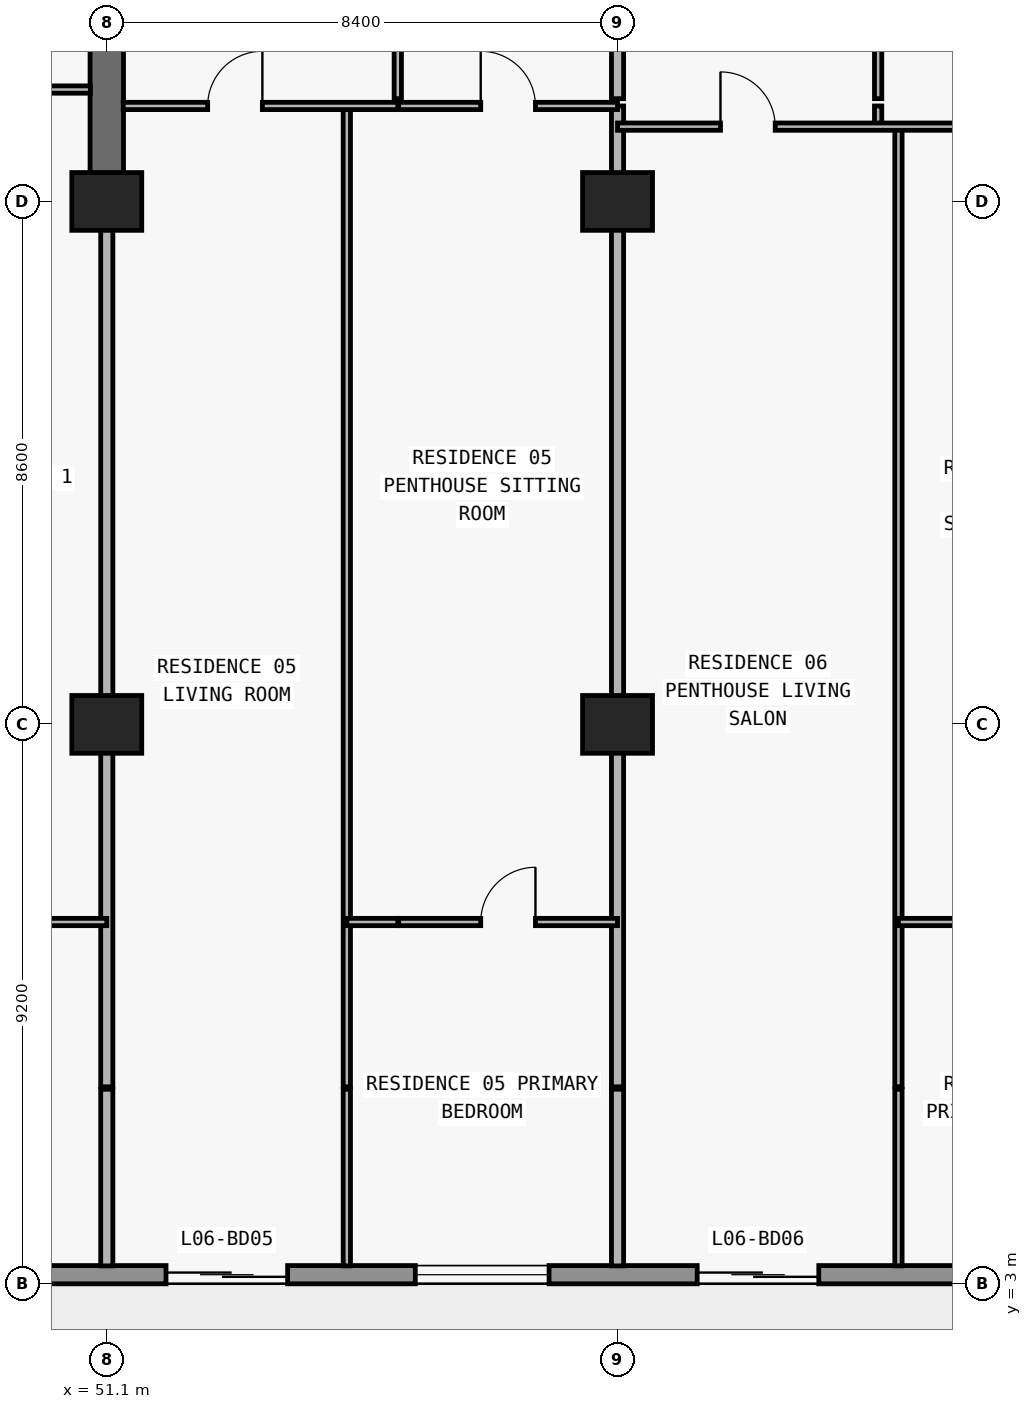
"""IFC4 building model, lengths in metres.
Left out: names, types, materials, properties, quantities, classifications, styles, units other than length and angle.
Written with IfcOpenShell. Run it as: python <this file> out.ifc"""

import sys

from ifc_helpers import new_model, si_unit, direction, frame, frame_2d, origin, origin_2d, place, context, subcontext, project, spatial, rectangle, extrude, element, fill, save


model = new_model("IFC4")
c1 = context("Model", 3, precision=1e-05, world=origin(), true_north=direction((0.0, 1.0)))
c2 = subcontext(c1, "Body", "Model", "MODEL_VIEW")
j1 = project(units=[si_unit("LENGTHUNIT", "METRE"), si_unit("PLANEANGLEUNIT", "RADIAN")], contexts=[c1])
p1 = place(None, origin())
s1 = spatial("IfcSite", under=j1, at=p1, CompositionType="ELEMENT")
p2 = place(p1, origin())
s2 = spatial("IfcBuilding", under=s1, at=p2, CompositionType="ELEMENT")
p3 = place(p2, frame((0.0, 0.0, 30.0)))
s3 = spatial("IfcBuildingStorey", under=s2, at=p3, CompositionType="ELEMENT", Elevation=30.0)
for number, where, z_axis, x_axis in (
    (1, (51.1, 12.2, 0.0), (0.0, 0.0, 1.0), (1.0, 0.0, 0.0)),
    (2, (59.5, 12.2, 0.0), (0.0, 0.0, 1.0), (1.0, 0.0, 0.0)),
    (3, (51.1, 20.8, 0.0), (0.0, 0.0, 1.0), (1.0, 0.0, 0.0)),
    (4, (59.5, 20.8, 0.0), (0.0, 0.0, 1.0), (1.0, 0.0, 0.0)),
):
    element("IfcColumn", number, at=place(p3, frame(where, z_axis=z_axis, x_axis=x_axis)), inside=s3, PredefinedType="COLUMN", context=c2, shape_type="SweptSolid", body=[
        extrude(rectangle(XDim=1.15, YDim=0.95, at=origin_2d()), origin(), (0.0, 0.0, 1.0), 3.05),
    ])
p4 = place(p3, frame((51.1, 20.8, 0.0), z_axis=(0.0, 0.0, 1.0), x_axis=(0.0, 1.0, 0.0)))
e5 = element("IfcWall", 5, at=p4, inside=s3, PredefinedType="SHEAR", context=c2, shape_type="SweptSolid", body=[
    extrude(rectangle(XDim=8.6, YDim=0.55, at=frame_2d((4.3, 0.0))), origin(), (0.0, 0.0, 1.0), 3.05),
])
p5 = place(p3, frame((72.7, 3.15, 0.0), z_axis=(0.0, 0.0, 1.0), x_axis=(-1.0, 0.0, 0.0)))
e6 = element("IfcWall", 6, at=p5, inside=s3, PredefinedType="STANDARD", context=c2, shape_type="SweptSolid", body=[
    extrude(rectangle(XDim=67.6, YDim=0.3, at=frame_2d((33.8, 0.0))), origin(), (0.0, 0.0, 1.0), 3.05),
])
p6 = place(p5, frame((59.826, 0.0, 0.0)))
e7 = element("IfcOpeningElement", 7, at=p6, cuts=e6, PredefinedType="OPENING", context=c2, shape_type="SweptSolid", body=[
    extrude(rectangle(XDim=2.0, YDim=2.3, at=frame_2d((1.0, 1.15))), frame((0.0, 0.16, 0.0), z_axis=(0.0, -1.0, 0.0), x_axis=(1.0, 0.0, 0.0)), (0.0, 0.0, 1.0), 0.32),
])
p7 = place(p5, frame((55.526, 0.0, 0.85)))
e8 = element("IfcOpeningElement", 8, at=p7, cuts=e6, PredefinedType="OPENING", context=c2, shape_type="SweptSolid", body=[
    extrude(rectangle(XDim=2.2, YDim=1.55, at=frame_2d((1.1, 0.775))), frame((0.0, 0.16, 0.0), z_axis=(0.0, -1.0, 0.0), x_axis=(1.0, 0.0, 0.0)), (0.0, 0.0, 1.0), 0.32),
])
p8 = place(p5, frame((51.09, 0.0, 0.0)))
e9 = element("IfcOpeningElement", 9, at=p8, cuts=e6, PredefinedType="OPENING", context=c2, shape_type="SweptSolid", body=[
    extrude(rectangle(XDim=2.0, YDim=2.3, at=frame_2d((1.0, 1.15))), frame((0.0, 0.16, 0.0), z_axis=(0.0, -1.0, 0.0), x_axis=(1.0, 0.0, 0.0)), (0.0, 0.0, 1.0), 0.32),
])
p9 = place(p5, frame((46.99, 0.0, 0.85)))
e10 = element("IfcOpeningElement", 10, at=p9, cuts=e6, PredefinedType="OPENING", context=c2, shape_type="SweptSolid", body=[
    extrude(rectangle(XDim=1.8, YDim=1.55, at=frame_2d((0.9, 0.775))), frame((0.0, 0.16, 0.0), z_axis=(0.0, -1.0, 0.0), x_axis=(1.0, 0.0, 0.0)), (0.0, 0.0, 1.0), 0.32),
])
p10 = place(p5, frame((43.026, 0.0, 0.0)))
e11 = element("IfcOpeningElement", 11, at=p10, cuts=e6, PredefinedType="OPENING", context=c2, shape_type="SweptSolid", body=[
    extrude(rectangle(XDim=2.0, YDim=2.3, at=frame_2d((1.0, 1.15))), frame((0.0, 0.16, 0.0), z_axis=(0.0, -1.0, 0.0), x_axis=(1.0, 0.0, 0.0)), (0.0, 0.0, 1.0), 0.32),
])
p11 = place(p5, frame((38.726, 0.0, 0.85)))
e12 = element("IfcOpeningElement", 12, at=p11, cuts=e6, PredefinedType="OPENING", context=c2, shape_type="SweptSolid", body=[
    extrude(rectangle(XDim=2.2, YDim=1.55, at=frame_2d((1.1, 0.775))), frame((0.0, 0.16, 0.0), z_axis=(0.0, -1.0, 0.0), x_axis=(1.0, 0.0, 0.0)), (0.0, 0.0, 1.0), 0.32),
])
p12 = place(p5, frame((34.69, 0.0, 0.0)))
e13 = element("IfcOpeningElement", 13, at=p12, cuts=e6, PredefinedType="OPENING", context=c2, shape_type="SweptSolid", body=[
    extrude(rectangle(XDim=2.0, YDim=2.3, at=frame_2d((1.0, 1.15))), frame((0.0, 0.16, 0.0), z_axis=(0.0, -1.0, 0.0), x_axis=(1.0, 0.0, 0.0)), (0.0, 0.0, 1.0), 0.32),
])
p13 = place(p5, frame((30.81, 0.0, 0.65)))
e14 = element("IfcOpeningElement", 14, at=p13, cuts=e6, PredefinedType="OPENING", context=c2, shape_type="SweptSolid", body=[
    extrude(rectangle(XDim=2.6, YDim=1.85, at=frame_2d((1.3, 0.925))), frame((0.0, 0.16, 0.0), z_axis=(0.0, -1.0, 0.0), x_axis=(1.0, 0.0, 0.0)), (0.0, 0.0, 1.0), 0.32),
])
p14 = place(p5, frame((24.7, 0.0, 0.85)))
e15 = element("IfcOpeningElement", 15, at=p14, cuts=e6, PredefinedType="OPENING", context=c2, shape_type="SweptSolid", body=[
    extrude(rectangle(XDim=2.2, YDim=1.55, at=frame_2d((1.1, 0.775))), frame((0.0, 0.16, 0.0), z_axis=(0.0, -1.0, 0.0), x_axis=(1.0, 0.0, 0.0)), (0.0, 0.0, 1.0), 0.32),
])
p15 = place(p5, frame((18.626, 0.0, 0.0)))
e16 = element("IfcOpeningElement", 16, at=p15, cuts=e6, PredefinedType="OPENING", context=c2, shape_type="SweptSolid", body=[
    extrude(rectangle(XDim=2.0, YDim=2.3, at=frame_2d((1.0, 1.15))), frame((0.0, 0.16, 0.0), z_axis=(0.0, -1.0, 0.0), x_axis=(1.0, 0.0, 0.0)), (0.0, 0.0, 1.0), 0.32),
])
p16 = place(p5, frame((14.326, 0.0, 0.85)))
e17 = element("IfcOpeningElement", 17, at=p16, cuts=e6, PredefinedType="OPENING", context=c2, shape_type="SweptSolid", body=[
    extrude(rectangle(XDim=2.2, YDim=1.55, at=frame_2d((1.1, 0.775))), frame((0.0, 0.16, 0.0), z_axis=(0.0, -1.0, 0.0), x_axis=(1.0, 0.0, 0.0)), (0.0, 0.0, 1.0), 0.32),
])
p17 = place(p5, frame((9.89, 0.0, 0.0)))
e18 = element("IfcOpeningElement", 18, at=p17, cuts=e6, PredefinedType="OPENING", context=c2, shape_type="SweptSolid", body=[
    extrude(rectangle(XDim=2.0, YDim=2.3, at=frame_2d((1.0, 1.15))), frame((0.0, 0.16, 0.0), z_axis=(0.0, -1.0, 0.0), x_axis=(1.0, 0.0, 0.0)), (0.0, 0.0, 1.0), 0.32),
])
p18 = place(p5, frame((5.79, 0.0, 0.85)))
e19 = element("IfcOpeningElement", 19, at=p18, cuts=e6, PredefinedType="OPENING", context=c2, shape_type="SweptSolid", body=[
    extrude(rectangle(XDim=1.8, YDim=1.55, at=frame_2d((0.9, 0.775))), frame((0.0, 0.16, 0.0), z_axis=(0.0, -1.0, 0.0), x_axis=(1.0, 0.0, 0.0)), (0.0, 0.0, 1.0), 0.32),
])
p19 = place(p3, frame((51.1, 3.295, 0.0), z_axis=(0.0, 0.0, 1.0), x_axis=(0.0, 1.0, 0.0)))
e20 = element("IfcWall", 20, at=p19, inside=s3, PredefinedType="PARTITIONING", context=c2, shape_type="SweptSolid", body=[
    extrude(rectangle(XDim=2.905, YDim=0.2, at=frame_2d((1.453, 0.0))), origin(), (0.0, 0.0, 1.0), 3.05),
])
p20 = place(p3, frame((51.1, 6.24, 0.0), z_axis=(0.0, 0.0, 1.0), x_axis=(0.0, 1.0, 0.0)))
e21 = element("IfcWall", 21, at=p20, inside=s3, PredefinedType="PARTITIONING", context=c2, shape_type="SweptSolid", body=[
    extrude(rectangle(XDim=14.555, YDim=0.2, at=frame_2d((7.277, 0.0))), origin(), (0.0, 0.0, 1.0), 2.11),
])
p21 = place(p3, frame((55.048, 3.295, 0.0), z_axis=(0.0, 0.0, 1.0), x_axis=(0.0, 1.0, 0.0)))
e22 = element("IfcWall", 22, at=p21, inside=s3, PredefinedType="PARTITIONING", context=c2, shape_type="SweptSolid", body=[
    extrude(rectangle(XDim=2.905, YDim=0.12, at=frame_2d((1.453, 0.0))), origin(), (0.0, 0.0, 1.0), 3.05),
])
p22 = place(p3, frame((55.048, 6.24, 0.0), z_axis=(0.0, 0.0, 1.0), x_axis=(0.0, 1.0, 0.0)))
e23 = element("IfcWall", 23, at=p22, inside=s3, PredefinedType="PARTITIONING", context=c2, shape_type="SweptSolid", body=[
    extrude(rectangle(XDim=16.13, YDim=0.12, at=frame_2d((8.065, 0.0))), origin(), (0.0, 0.0, 1.0), 3.05),
])
p23 = place(p3, frame((55.886, 22.49, 0.0), z_axis=(0.0, 0.0, 1.0), x_axis=(0.0, 1.0, 0.0)))
e24 = element("IfcWall", 24, at=p23, inside=s3, PredefinedType="PARTITIONING", context=c2, shape_type="SweptSolid", body=[
    extrude(rectangle(XDim=4.69, YDim=0.12, at=frame_2d((2.345, 0.0))), origin(), (0.0, 0.0, 1.0), 3.05),
])
p24 = place(p23, frame((1.895, 0.0, 0.0)))
e25 = element("IfcOpeningElement", 25, at=p24, cuts=e24, PredefinedType="OPENING", context=c2, shape_type="SweptSolid", body=[
    extrude(rectangle(XDim=0.9, YDim=2.15, at=frame_2d((0.45, 1.075))), frame((0.0, 0.07, 0.0), z_axis=(0.0, -1.0, 0.0), x_axis=(1.0, 0.0, 0.0)), (0.0, 0.0, 1.0), 0.14),
])
p25 = place(p3, frame((59.5, 3.295, 0.0), z_axis=(0.0, 0.0, 1.0), x_axis=(0.0, 1.0, 0.0)))
e26 = element("IfcWall", 26, at=p25, inside=s3, PredefinedType="PARTITIONING", context=c2, shape_type="SweptSolid", body=[
    extrude(rectangle(XDim=2.905, YDim=0.2, at=frame_2d((1.453, 0.0))), origin(), (0.0, 0.0, 1.0), 3.05),
])
p26 = place(p3, frame((59.5, 6.24, 0.0), z_axis=(0.0, 0.0, 1.0), x_axis=(0.0, 1.0, 0.0)))
e27 = element("IfcWall", 27, at=p26, inside=s3, PredefinedType="PARTITIONING", context=c2, shape_type="SweptSolid", body=[
    extrude(rectangle(XDim=16.13, YDim=0.2, at=frame_2d((8.065, 0.0))), origin(), (0.0, 0.0, 1.0), 2.11),
])
p27 = place(p3, frame((59.5, 22.49, 0.0), z_axis=(0.0, 0.0, 1.0), x_axis=(0.0, 1.0, 0.0)))
e28 = element("IfcWall", 28, at=p27, inside=s3, PredefinedType="PARTITIONING", context=c2, shape_type="SweptSolid", body=[
    extrude(rectangle(XDim=4.69, YDim=0.2, at=frame_2d((2.345, 0.0))), origin(), (0.0, 0.0, 1.0), 2.11),
])
p28 = place(p3, frame((63.786, 22.03, 0.0), z_axis=(0.0, 0.0, 1.0), x_axis=(0.0, 1.0, 0.0)))
e29 = element("IfcWall", 29, at=p28, inside=s3, PredefinedType="PARTITIONING", context=c2, shape_type="SweptSolid", body=[
    extrude(rectangle(XDim=0.34, YDim=0.12, at=frame_2d((0.17, 0.0))), origin(), (0.0, 0.0, 1.0), 3.05),
])
p29 = place(p3, frame((63.786, 22.49, 0.0), z_axis=(0.0, 0.0, 1.0), x_axis=(0.0, 1.0, 0.0)))
e30 = element("IfcWall", 30, at=p29, inside=s3, PredefinedType="PARTITIONING", context=c2, shape_type="SweptSolid", body=[
    extrude(rectangle(XDim=4.69, YDim=0.12, at=frame_2d((2.345, 0.0))), origin(), (0.0, 0.0, 1.0), 3.05),
])
p30 = place(p29, frame((1.895, 0.0, 0.0)))
e31 = element("IfcOpeningElement", 31, at=p30, cuts=e30, PredefinedType="OPENING", context=c2, shape_type="SweptSolid", body=[
    extrude(rectangle(XDim=0.9, YDim=2.15, at=frame_2d((0.45, 1.075))), frame((0.0, 0.07, 0.0), z_axis=(0.0, -1.0, 0.0), x_axis=(1.0, 0.0, 0.0)), (0.0, 0.0, 1.0), 0.14),
])
p31 = place(p3, frame((64.12, 3.295, 0.0), z_axis=(0.0, 0.0, 1.0), x_axis=(0.0, 1.0, 0.0)))
e32 = element("IfcWall", 32, at=p31, inside=s3, PredefinedType="PARTITIONING", context=c2, shape_type="SweptSolid", body=[
    extrude(rectangle(XDim=2.905, YDim=0.12, at=frame_2d((1.453, 0.0))), origin(), (0.0, 0.0, 1.0), 3.05),
])
p32 = place(p3, frame((64.12, 6.24, 0.0), z_axis=(0.0, 0.0, 1.0), x_axis=(0.0, 1.0, 0.0)))
e33 = element("IfcWall", 33, at=p32, inside=s3, PredefinedType="PARTITIONING", context=c2, shape_type="SweptSolid", body=[
    extrude(rectangle(XDim=15.79, YDim=0.12, at=frame_2d((7.895, 0.0))), origin(), (0.0, 0.0, 1.0), 3.05),
])
p33 = place(p3, frame((42.7, 8.95, 0.0), z_axis=(0.0, 0.0, 1.0), x_axis=(1.0, 0.0, 0.0)))
e34 = element("IfcWall", 34, at=p33, inside=s3, PredefinedType="PARTITIONING", context=c2, shape_type="SweptSolid", body=[
    extrude(rectangle(XDim=8.4, YDim=0.12, at=frame_2d((4.2, 0.0))), origin(), (0.0, 0.0, 1.0), 3.05),
])
p34 = place(p33, frame((3.75, 0.0, 0.0)))
e35 = element("IfcOpeningElement", 35, at=p34, cuts=e34, PredefinedType="OPENING", context=c2, shape_type="SweptSolid", body=[
    extrude(rectangle(XDim=0.9, YDim=2.15, at=frame_2d((0.45, 1.075))), frame((0.0, 0.07, 0.0), z_axis=(0.0, -1.0, 0.0), x_axis=(1.0, 0.0, 0.0)), (0.0, 0.0, 1.0), 0.14),
])
p35 = place(p3, frame((55.048, 8.95, 0.0), z_axis=(0.0, 0.0, 1.0), x_axis=(1.0, 0.0, 0.0)))
e36 = element("IfcWall", 36, at=p35, inside=s3, PredefinedType="PARTITIONING", context=c2, shape_type="SweptSolid", body=[
    extrude(rectangle(XDim=0.838, YDim=0.12, at=frame_2d((0.419, 0.0))), origin(), (0.0, 0.0, 1.0), 3.05),
])
p36 = place(p3, frame((55.9, 8.95, 0.0), z_axis=(0.0, 0.0, 1.0), x_axis=(1.0, 0.0, 0.0)))
e37 = element("IfcWall", 37, at=p36, inside=s3, PredefinedType="PARTITIONING", context=c2, shape_type="SweptSolid", body=[
    extrude(rectangle(XDim=3.6, YDim=0.12, at=frame_2d((1.8, 0.0))), origin(), (0.0, 0.0, 1.0), 3.05),
])
p37 = place(p36, frame((1.35, 0.0, 0.0)))
e38 = element("IfcOpeningElement", 38, at=p37, cuts=e37, PredefinedType="OPENING", context=c2, shape_type="SweptSolid", body=[
    extrude(rectangle(XDim=0.9, YDim=2.15, at=frame_2d((0.45, 1.075))), frame((0.0, 0.07, 0.0), z_axis=(0.0, -1.0, 0.0), x_axis=(1.0, 0.0, 0.0)), (0.0, 0.0, 1.0), 0.14),
])
p38 = place(p3, frame((64.12, 8.95, 0.0), z_axis=(0.0, 0.0, 1.0), x_axis=(1.0, 0.0, 0.0)))
e39 = element("IfcWall", 39, at=p38, inside=s3, PredefinedType="PARTITIONING", context=c2, shape_type="SweptSolid", body=[
    extrude(rectangle(XDim=3.78, YDim=0.12, at=frame_2d((1.89, 0.0))), origin(), (0.0, 0.0, 1.0), 3.05),
])
p39 = place(p38, frame((1.44, 0.0, 0.0)))
e40 = element("IfcOpeningElement", 40, at=p39, cuts=e39, PredefinedType="OPENING", context=c2, shape_type="SweptSolid", body=[
    extrude(rectangle(XDim=0.9, YDim=2.15, at=frame_2d((0.45, 1.075))), frame((0.0, 0.07, 0.0), z_axis=(0.0, -1.0, 0.0), x_axis=(1.0, 0.0, 0.0)), (0.0, 0.0, 1.0), 0.14),
])
p40 = place(p3, frame((59.5, 22.03, 0.0), z_axis=(0.0, 0.0, 1.0), x_axis=(1.0, 0.0, 0.0)))
e41 = element("IfcWall", 41, at=p40, inside=s3, PredefinedType="PARTITIONING", context=c2, shape_type="SweptSolid", body=[
    extrude(rectangle(XDim=8.4, YDim=0.12, at=frame_2d((4.2, 0.0))), origin(), (0.0, 0.0, 1.0), 3.05),
])
p41 = place(p40, frame((1.693, 0.0, 0.0)))
e42 = element("IfcOpeningElement", 42, at=p41, cuts=e41, PredefinedType="OPENING", context=c2, shape_type="SweptSolid", body=[
    extrude(rectangle(XDim=0.9, YDim=2.15, at=frame_2d((0.45, 1.075))), frame((0.0, 0.07, 0.0), z_axis=(0.0, -1.0, 0.0), x_axis=(1.0, 0.0, 0.0)), (0.0, 0.0, 1.0), 0.14),
])
p42 = place(p40, frame((6.06, 0.0, 0.0)))
e43 = element("IfcOpeningElement", 43, at=p42, cuts=e41, PredefinedType="OPENING", context=c2, shape_type="SweptSolid", body=[
    extrude(rectangle(XDim=0.9, YDim=2.15, at=frame_2d((0.45, 1.075))), frame((0.0, 0.07, 0.0), z_axis=(0.0, -1.0, 0.0), x_axis=(1.0, 0.0, 0.0)), (0.0, 0.0, 1.0), 0.14),
])
p43 = place(p3, frame((51.37, 22.37, 0.0), z_axis=(0.0, 0.0, 1.0), x_axis=(1.0, 0.0, 0.0)))
e44 = element("IfcWall", 44, at=p43, inside=s3, PredefinedType="PARTITIONING", context=c2, shape_type="SweptSolid", body=[
    extrude(rectangle(XDim=4.516, YDim=0.12, at=frame_2d((2.258, 0.0))), origin(), (0.0, 0.0, 1.0), 3.05),
])
p44 = place(p43, frame((1.389, 0.0, 0.0)))
e45 = element("IfcOpeningElement", 45, at=p44, cuts=e44, PredefinedType="OPENING", context=c2, shape_type="SweptSolid", body=[
    extrude(rectangle(XDim=0.9, YDim=2.15, at=frame_2d((0.45, 1.075))), frame((0.0, 0.07, 0.0), z_axis=(0.0, -1.0, 0.0), x_axis=(1.0, 0.0, 0.0)), (0.0, 0.0, 1.0), 0.14),
])
p45 = place(p3, frame((55.9, 22.37, 0.0), z_axis=(0.0, 0.0, 1.0), x_axis=(1.0, 0.0, 0.0)))
e46 = element("IfcWall", 46, at=p45, inside=s3, PredefinedType="PARTITIONING", context=c2, shape_type="SweptSolid", body=[
    extrude(rectangle(XDim=3.6, YDim=0.12, at=frame_2d((1.8, 0.0))), origin(), (0.0, 0.0, 1.0), 3.05),
])
p46 = place(p45, frame((1.35, 0.0, 0.0)))
e47 = element("IfcOpeningElement", 47, at=p46, cuts=e46, PredefinedType="OPENING", context=c2, shape_type="SweptSolid", body=[
    extrude(rectangle(XDim=0.9, YDim=2.15, at=frame_2d((0.45, 1.075))), frame((0.0, 0.07, 0.0), z_axis=(0.0, -1.0, 0.0), x_axis=(1.0, 0.0, 0.0)), (0.0, 0.0, 1.0), 0.14),
])
p47 = place(p3, frame((42.705, 22.64, 0.0), z_axis=(0.0, 0.0, 1.0), x_axis=(1.0, 0.0, 0.0)))
e48 = element("IfcWall", 48, at=p47, inside=s3, PredefinedType="PARTITIONING", context=c2, shape_type="SweptSolid", body=[
    extrude(rectangle(XDim=8.125, YDim=0.12, at=frame_2d((4.062, 0.0))), origin(), (0.0, 0.0, 1.0), 3.05),
])
p48 = place(p47, frame((3.613, 0.0, 0.0)))
e49 = element("IfcOpeningElement", 49, at=p48, cuts=e48, PredefinedType="OPENING", context=c2, shape_type="SweptSolid", body=[
    extrude(rectangle(XDim=0.9, YDim=2.15, at=frame_2d((0.45, 1.075))), frame((0.0, 0.07, 0.0), z_axis=(0.0, -1.0, 0.0), x_axis=(1.0, 0.0, 0.0)), (0.0, 0.0, 1.0), 0.14),
])
p49 = place(p15, origin())
e50 = element("IfcDoor", 50, at=p49, inside=s3, OperationType="DOUBLE_DOOR_SLIDING", PredefinedType="DOOR", context=c2, shape_type="SweptSolid", body=[
    extrude(rectangle(XDim=2.0, YDim=2.3, at=frame_2d((1.0, 1.15))), frame((0.0, 0.025, 0.0), z_axis=(0.0, -1.0, 0.0), x_axis=(1.0, 0.0, 0.0)), (0.0, 0.0, 1.0), 0.05),
])
fill(e16, e50)
p50 = place(p16, origin())
e51 = element("IfcWindow", 51, at=p50, inside=s3, PartitioningType="SINGLE_PANEL", PredefinedType="WINDOW", context=c2, shape_type="SweptSolid", body=[
    extrude(rectangle(XDim=2.2, YDim=1.55, at=frame_2d((1.1, 0.775))), frame((0.0, 0.03, 0.0), z_axis=(0.0, -1.0, 0.0), x_axis=(1.0, 0.0, 0.0)), (0.0, 0.0, 1.0), 0.06),
])
fill(e17, e51)
p51 = place(p17, origin())
e52 = element("IfcDoor", 52, at=p51, inside=s3, OperationType="DOUBLE_DOOR_SLIDING", PredefinedType="DOOR", context=c2, shape_type="SweptSolid", body=[
    extrude(rectangle(XDim=2.0, YDim=2.3, at=frame_2d((1.0, 1.15))), frame((0.0, 0.025, 0.0), z_axis=(0.0, -1.0, 0.0), x_axis=(1.0, 0.0, 0.0)), (0.0, 0.0, 1.0), 0.05),
])
fill(e18, e52)
p52 = place(p44, origin())
e53 = element("IfcDoor", 53, at=p52, inside=s3, OperationType="SINGLE_SWING_RIGHT", PredefinedType="DOOR", context=c2, shape_type="SweptSolid", body=[
    extrude(rectangle(XDim=0.9, YDim=2.15, at=frame_2d((0.45, 1.075))), frame((0.0, 0.025, 0.0), z_axis=(0.0, -1.0, 0.0), x_axis=(1.0, 0.0, 0.0)), (0.0, 0.0, 1.0), 0.05),
])
fill(e45, e53)
p53 = place(p46, origin())
e54 = element("IfcDoor", 54, at=p53, inside=s3, OperationType="SINGLE_SWING_LEFT", PredefinedType="DOOR", context=c2, shape_type="SweptSolid", body=[
    extrude(rectangle(XDim=0.9, YDim=2.15, at=frame_2d((0.45, 1.075))), frame((0.0, 0.025, 0.0), z_axis=(0.0, -1.0, 0.0), x_axis=(1.0, 0.0, 0.0)), (0.0, 0.0, 1.0), 0.05),
])
fill(e47, e54)
p54 = place(p37, origin())
e55 = element("IfcDoor", 55, at=p54, inside=s3, OperationType="SINGLE_SWING_RIGHT", PredefinedType="DOOR", context=c2, shape_type="SweptSolid", body=[
    extrude(rectangle(XDim=0.9, YDim=2.15, at=frame_2d((0.45, 1.075))), frame((0.0, 0.025, 0.0), z_axis=(0.0, -1.0, 0.0), x_axis=(1.0, 0.0, 0.0)), (0.0, 0.0, 1.0), 0.05),
])
fill(e38, e55)
p55 = place(p41, origin())
e56 = element("IfcDoor", 56, at=p55, inside=s3, OperationType="SINGLE_SWING_LEFT", PredefinedType="DOOR", context=c2, shape_type="SweptSolid", body=[
    extrude(rectangle(XDim=0.9, YDim=2.15, at=frame_2d((0.45, 1.075))), frame((0.0, 0.025, 0.0), z_axis=(0.0, -1.0, 0.0), x_axis=(1.0, 0.0, 0.0)), (0.0, 0.0, 1.0), 0.05),
])
fill(e42, e56)
save(model, sys.argv[1])
